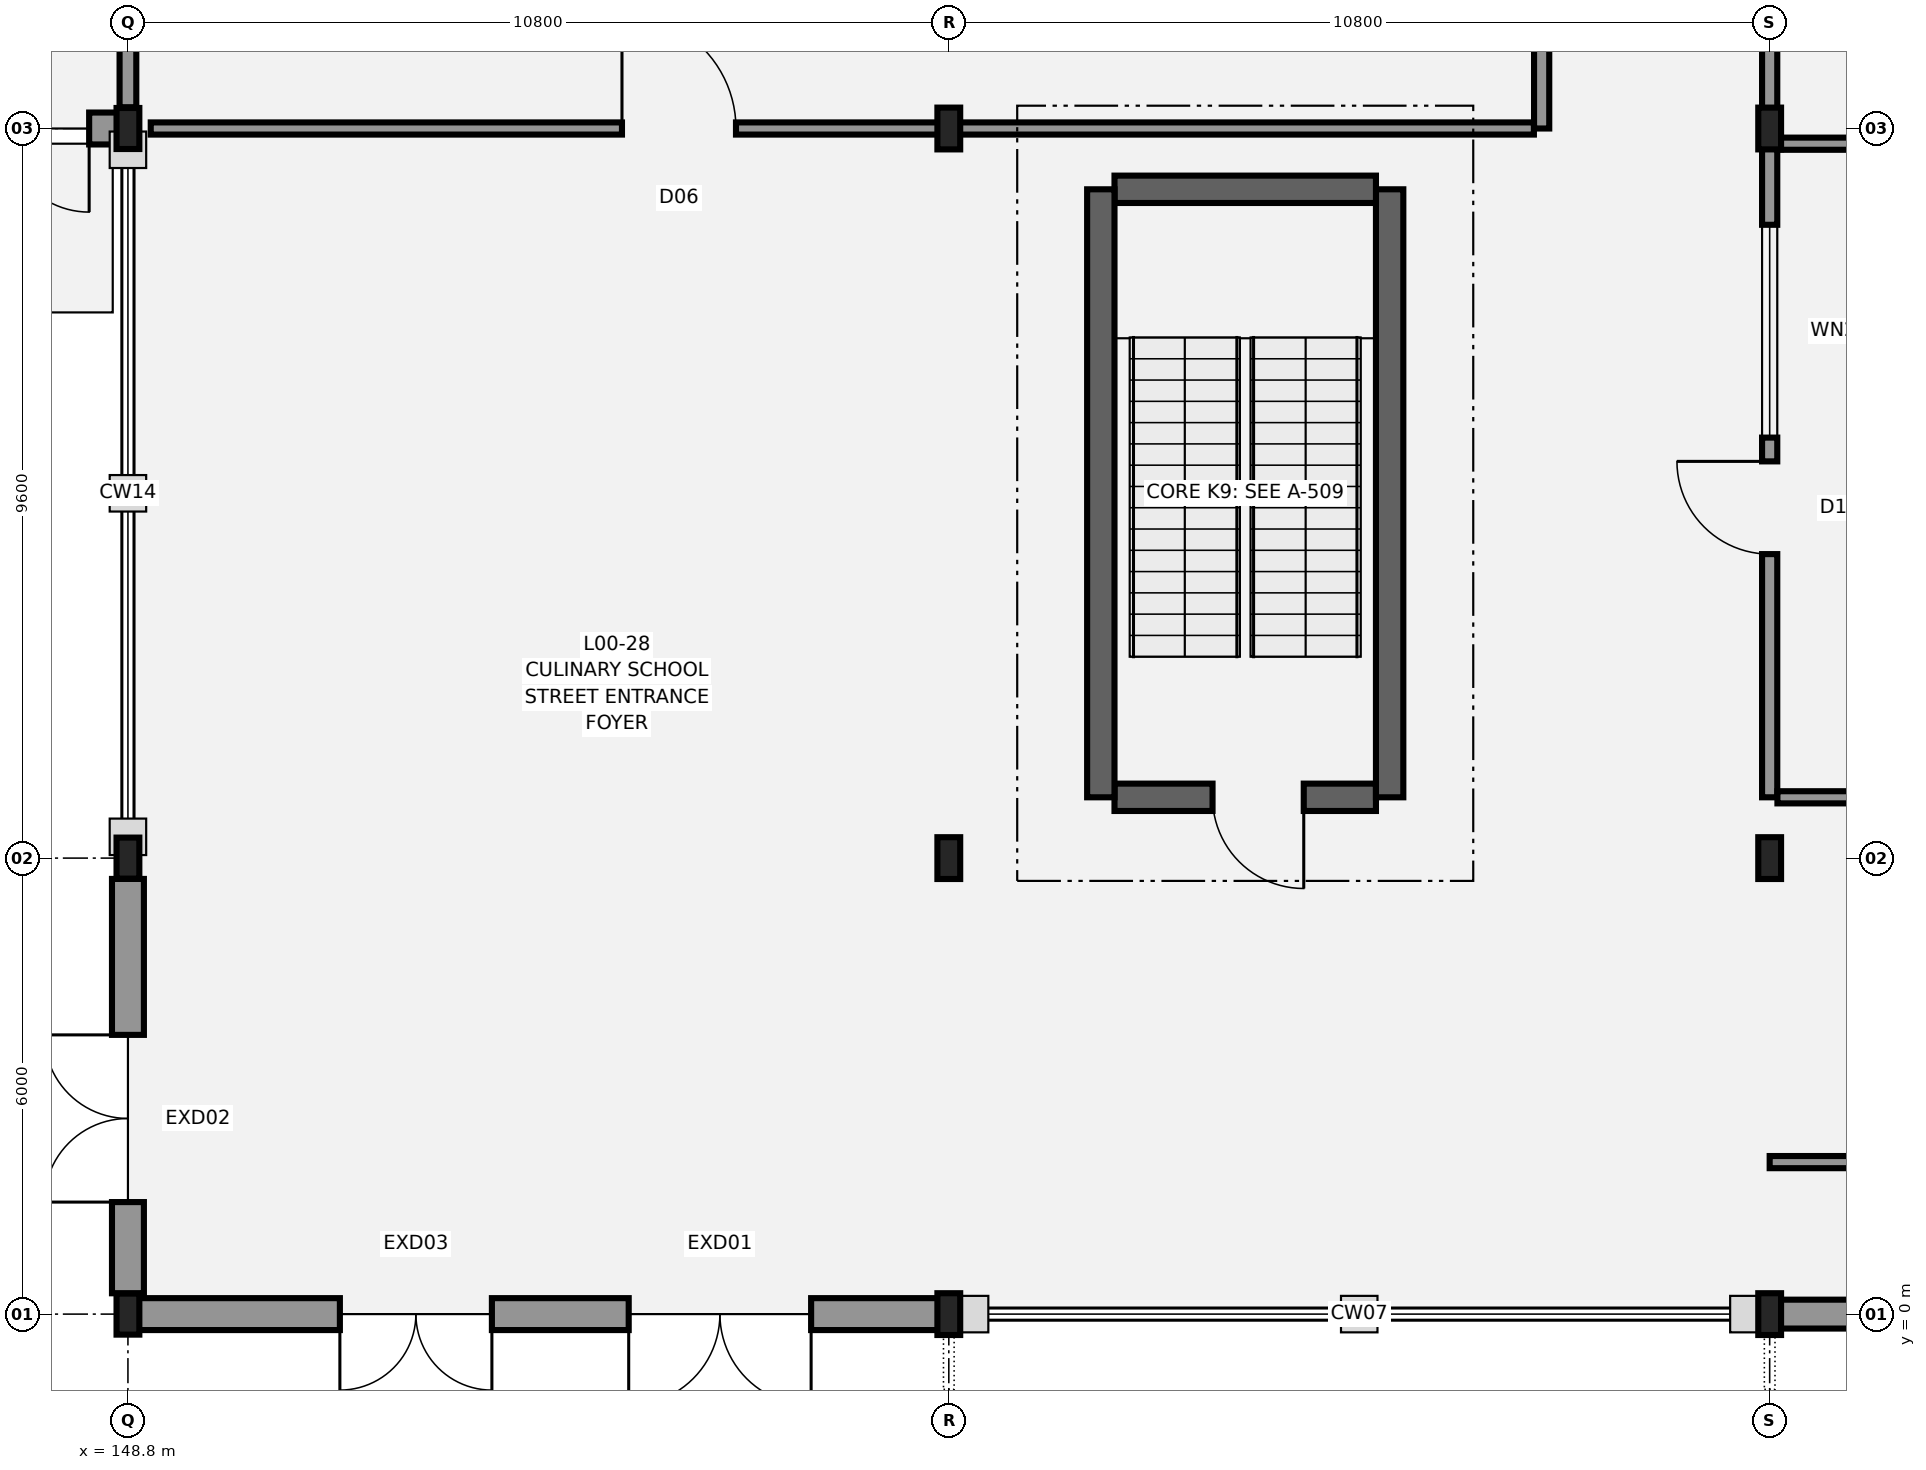
"""IFC4 building model, lengths in metres.
Left out: names, types, materials, properties, quantities, classifications, styles, units other than length and angle.
Written with IfcOpenShell. Run it as: python <this file> out.ifc"""

import sys

from ifc_helpers import new_model, si_unit, direction, frame, frame_2d, origin, origin_2d, place, context, subcontext, project, spatial, rectangle, i_section, extrude, element, fill, save


model = new_model("IFC4")
c1 = context("Model", 3, precision=1e-05, world=origin(), true_north=direction((0.0, 1.0)))
c2 = subcontext(c1, "Body", "Model", "MODEL_VIEW")
j1 = project(units=[si_unit("LENGTHUNIT", "METRE"), si_unit("PLANEANGLEUNIT", "RADIAN")], contexts=[c1])
p1 = place(None, origin())
s1 = spatial("IfcSite", under=j1, at=p1, CompositionType="ELEMENT")
p2 = place(p1, origin())
s2 = spatial("IfcBuilding", under=s1, at=p2, CompositionType="ELEMENT")
p3 = place(p2, origin())
s3 = spatial("IfcBuildingStorey", under=s2, at=p3, CompositionType="ELEMENT", Elevation=0.0)
for number, where, z_axis, x_axis in (
    (1, (148.8, 0.0, 0.0), (0.0, 0.0, 1.0), (1.0, 0.0, 0.0)),
    (2, (148.8, 6.0, 0.0), (0.0, 0.0, 1.0), (1.0, 0.0, 0.0)),
    (3, (148.8, 15.6, 0.0), (0.0, 0.0, 1.0), (1.0, 0.0, 0.0)),
):
    element("IfcColumn", number, at=place(p3, frame(where, z_axis=z_axis, x_axis=x_axis)), inside=s3, PredefinedType="COLUMN", context=c2, shape_type="SweptSolid", body=[
        extrude(i_section(OverallWidth=0.3, OverallDepth=0.54, WebThickness=0.012, FlangeThickness=0.024, FilletRadius=0.027, at=origin_2d()), origin(), (0.0, 0.0, 1.0), 5.4),
    ])
for number, where, z_axis, x_axis in (
    (4, (159.6, 0.0, 0.0), (0.0, 0.0, 1.0), (1.0, 0.0, 0.0)),
    (5, (159.6, 6.0, 0.0), (0.0, 0.0, 1.0), (1.0, 0.0, 0.0)),
    (6, (159.6, 15.6, 0.0), (0.0, 0.0, 1.0), (1.0, 0.0, 0.0)),
    (7, (170.4, 0.0, 0.0), (0.0, 0.0, 1.0), (1.0, 0.0, 0.0)),
    (8, (170.4, 6.0, 0.0), (0.0, 0.0, 1.0), (1.0, 0.0, 0.0)),
    (9, (170.4, 15.6, 0.0), (0.0, 0.0, 1.0), (1.0, 0.0, 0.0)),
):
    element("IfcColumn", number, at=place(p3, frame(where, z_axis=z_axis, x_axis=x_axis)), inside=s3, PredefinedType="COLUMN", context=c2, shape_type="SweptSolid", body=[
        extrude(i_section(OverallWidth=0.3, OverallDepth=0.55, WebThickness=0.015, FlangeThickness=0.029, FilletRadius=0.027, at=origin_2d()), origin(), (0.0, 0.0, 1.0), 5.4),
    ])
p4 = place(p3, frame((165.22, 6.8, 0.0), z_axis=(0.0, 0.0, 1.0), x_axis=(-1.0, 0.0, 0.0)))
e10 = element("IfcWall", 10, at=p4, inside=s3, PredefinedType="SHEAR", context=c2, shape_type="SweptSolid", body=[
    extrude(rectangle(XDim=3.44, YDim=0.36, at=frame_2d((1.72, 0.0))), origin(), (0.0, 0.0, 1.0), 5.12),
])
p5 = place(p4, frame((0.95, 0.0, 0.0)))
e11 = element("IfcOpeningElement", 11, at=p5, cuts=e10, PredefinedType="OPENING", context=c2, shape_type="SweptSolid", body=[
    extrude(rectangle(XDim=1.2, YDim=2.2, at=frame_2d((0.6, 1.1))), frame((0.0, 0.19, 0.0), z_axis=(0.0, -1.0, 0.0), x_axis=(1.0, 0.0, 0.0)), (0.0, 0.0, 1.0), 0.38),
])
p6 = place(p3, frame((165.4, 6.8, 0.0), z_axis=(0.0, 0.0, 1.0), x_axis=(0.0, 1.0, 0.0)))
e12 = element("IfcWall", 12, at=p6, inside=s3, PredefinedType="SHEAR", context=c2, shape_type="SweptSolid", body=[
    extrude(rectangle(XDim=8.0, YDim=0.36, at=frame_2d((4.0, 0.0))), origin(), (0.0, 0.0, 1.0), 5.12),
])
p7 = place(p3, frame((165.22, 14.8, 0.0), z_axis=(0.0, 0.0, 1.0), x_axis=(-1.0, 0.0, 0.0)))
e13 = element("IfcWall", 13, at=p7, inside=s3, PredefinedType="SHEAR", context=c2, shape_type="SweptSolid", body=[
    extrude(rectangle(XDim=3.44, YDim=0.36, at=frame_2d((1.72, 0.0))), origin(), (0.0, 0.0, 1.0), 5.12),
])
p8 = place(p3, frame((161.6, 14.8, 0.0), z_axis=(0.0, 0.0, 1.0), x_axis=(0.0, -1.0, 0.0)))
e14 = element("IfcWall", 14, at=p8, inside=s3, PredefinedType="SHEAR", context=c2, shape_type="SweptSolid", body=[
    extrude(rectangle(XDim=8.0, YDim=0.36, at=frame_2d((4.0, 0.0))), origin(), (0.0, 0.0, 1.0), 5.12),
])
p9 = place(p3, frame((148.79, 15.6, 0.0), z_axis=(0.0, 0.0, 1.0), x_axis=(-1.0, 0.0, 0.0)))
e15 = element("IfcWall", 15, at=p9, inside=s3, PredefinedType="STANDARD", context=c2, shape_type="SweptSolid", body=[
    extrude(rectangle(XDim=3.59, YDim=0.42, at=frame_2d((1.795, 0.0))), origin(), (0.0, 0.0, 1.0), 4.665),
])
p10 = place(p9, frame((0.5, 0.0, 0.0)))
e16 = element("IfcOpeningElement", 16, at=p10, cuts=e15, PredefinedType="OPENING", context=c2, shape_type="SweptSolid", body=[
    extrude(rectangle(XDim=2.2, YDim=2.4, at=frame_2d((1.1, 1.2))), frame((0.0, 0.22, 0.0), z_axis=(0.0, -1.0, 0.0), x_axis=(1.0, 0.0, 0.0)), (0.0, 0.0, 1.0), 0.44),
])
p11 = place(p3, frame((159.588, 0.0, 0.0), z_axis=(0.0, 0.0, 1.0), x_axis=(-1.0, 0.0, 0.0)))
e17 = element("IfcWall", 17, at=p11, inside=s3, PredefinedType="STANDARD", context=c2, shape_type="SweptSolid", body=[
    extrude(rectangle(XDim=10.778, YDim=0.42, at=frame_2d((5.389, 0.0))), origin(), (0.0, 0.0, 1.0), 4.665),
])
p12 = place(p11, frame((1.8, 0.0, 0.0)))
e18 = element("IfcOpeningElement", 18, at=p12, cuts=e17, PredefinedType="OPENING", context=c2, shape_type="SweptSolid", body=[
    extrude(rectangle(XDim=2.4, YDim=2.4, at=frame_2d((1.2, 1.2))), frame((0.0, 0.22, 0.0), z_axis=(0.0, -1.0, 0.0), x_axis=(1.0, 0.0, 0.0)), (0.0, 0.0, 1.0), 0.44),
])
p13 = place(p11, frame((6.0, 0.0, 0.0)))
e19 = element("IfcOpeningElement", 19, at=p13, cuts=e17, PredefinedType="OPENING", context=c2, shape_type="SweptSolid", body=[
    extrude(rectangle(XDim=2.0, YDim=2.3, at=frame_2d((1.0, 1.15))), frame((0.0, 0.22, 0.0), z_axis=(0.0, -1.0, 0.0), x_axis=(1.0, 0.0, 0.0)), (0.0, 0.0, 1.0), 0.44),
])
p14 = place(p3, frame((181.188, 0.0, 0.0), z_axis=(0.0, 0.0, 1.0), x_axis=(-1.0, 0.0, 0.0)))
e20 = element("IfcWall", 20, at=p14, inside=s3, PredefinedType="STANDARD", context=c2, shape_type="SweptSolid", body=[
    extrude(rectangle(XDim=10.777, YDim=0.38, at=frame_2d((5.388, 0.0))), origin(), (0.0, 0.0, 1.0), 4.665),
])
p15 = place(p14, frame((1.0, 0.0, 0.8)))
e21 = element("IfcOpeningElement", 21, at=p15, cuts=e20, PredefinedType="OPENING", context=c2, shape_type="SweptSolid", body=[
    extrude(rectangle(XDim=1.2, YDim=1.8, at=frame_2d((0.6, 0.9))), frame((0.0, 0.2, 0.0), z_axis=(0.0, -1.0, 0.0), x_axis=(1.0, 0.0, 0.0)), (0.0, 0.0, 1.0), 0.4),
])
p16 = place(p14, frame((5.6, 0.0, 0.8)))
e22 = element("IfcOpeningElement", 22, at=p16, cuts=e20, PredefinedType="OPENING", context=c2, shape_type="SweptSolid", body=[
    extrude(rectangle(XDim=1.5, YDim=1.8, at=frame_2d((0.75, 0.9))), frame((0.0, 0.2, 0.0), z_axis=(0.0, -1.0, 0.0), x_axis=(1.0, 0.0, 0.0)), (0.0, 0.0, 1.0), 0.4),
])
p17 = place(p3, frame((148.8, 0.274, 0.0), z_axis=(0.0, 0.0, 1.0), x_axis=(0.0, 1.0, 0.0)))
e23 = element("IfcWall", 23, at=p17, inside=s3, PredefinedType="STANDARD", context=c2, shape_type="SweptSolid", body=[
    extrude(rectangle(XDim=5.452, YDim=0.42, at=frame_2d((2.726, 0.0))), origin(), (0.0, 0.0, 1.0), 4.765),
])
p18 = place(p17, frame((1.2, 0.0, 0.0)))
e24 = element("IfcOpeningElement", 24, at=p18, cuts=e23, PredefinedType="OPENING", context=c2, shape_type="SweptSolid", body=[
    extrude(rectangle(XDim=2.2, YDim=2.4, at=frame_2d((1.1, 1.2))), frame((0.0, 0.22, 0.0), z_axis=(0.0, -1.0, 0.0), x_axis=(1.0, 0.0, 0.0)), (0.0, 0.0, 1.0), 0.44),
])
p19 = place(p3, frame((148.8, 15.88, 0.0), z_axis=(0.0, 0.0, 1.0), x_axis=(0.0, 1.0, 0.0)))
e25 = element("IfcWall", 25, at=p19, inside=s3, PredefinedType="PARTITIONING", context=c2, shape_type="SweptSolid", body=[
    extrude(rectangle(XDim=11.44, YDim=0.22, at=frame_2d((5.72, 0.0))), origin(), (0.0, 0.0, 1.0), 4.765),
])
p20 = place(p3, frame((170.4, 2.0, 0.0), z_axis=(0.0, 0.0, 1.0), x_axis=(1.0, 0.0, 0.0)))
e26 = element("IfcWall", 26, at=p20, inside=s3, PredefinedType="PARTITIONING", context=c2, shape_type="SweptSolid", body=[
    extrude(rectangle(XDim=21.388, YDim=0.16, at=frame_2d((10.694, 0.0))), origin(), (0.0, 0.0, 1.0), 5.04),
])
p21 = place(p20, frame((5.0, 0.0, 0.0)))
e27 = element("IfcOpeningElement", 27, at=p21, cuts=e26, PredefinedType="OPENING", context=c2, shape_type="SweptSolid", body=[
    extrude(rectangle(XDim=1.3, YDim=2.15, at=frame_2d((0.65, 1.075))), frame((0.0, 0.09, 0.0), z_axis=(0.0, -1.0, 0.0), x_axis=(1.0, 0.0, 0.0)), (0.0, 0.0, 1.0), 0.18),
])
p22 = place(p3, frame((167.4, 15.6, 0.0), z_axis=(0.0, 0.0, 1.0), x_axis=(0.0, 1.0, 0.0)))
e28 = element("IfcWall", 28, at=p22, inside=s3, PredefinedType="PARTITIONING", context=c2, shape_type="SweptSolid", body=[
    extrude(rectangle(XDim=47.828, YDim=0.2, at=frame_2d((23.914, 0.0))), origin(), (0.0, 0.0, 1.0), 5.04),
])
p23 = place(p22, frame((8.0, 0.0, 0.0)))
e29 = element("IfcOpeningElement", 29, at=p23, cuts=e28, PredefinedType="OPENING", context=c2, shape_type="SweptSolid", body=[
    extrude(rectangle(XDim=1.6, YDim=2.2, at=frame_2d((0.8, 1.1))), frame((0.0, 0.11, 0.0), z_axis=(0.0, -1.0, 0.0), x_axis=(1.0, 0.0, 0.0)), (0.0, 0.0, 1.0), 0.22),
])
p24 = place(p22, frame((32.0, 0.0, 0.0)))
e30 = element("IfcOpeningElement", 30, at=p24, cuts=e28, PredefinedType="OPENING", context=c2, shape_type="SweptSolid", body=[
    extrude(rectangle(XDim=1.6, YDim=2.2, at=frame_2d((0.8, 1.1))), frame((0.0, 0.11, 0.0), z_axis=(0.0, -1.0, 0.0), x_axis=(1.0, 0.0, 0.0)), (0.0, 0.0, 1.0), 0.22),
])
p25 = place(p22, frame((5.0, 0.0, 1.05)))
e31 = element("IfcOpeningElement", 31, at=p25, cuts=e28, PredefinedType="OPENING", context=c2, shape_type="SweptSolid", body=[
    extrude(rectangle(XDim=2.2, YDim=1.3, at=frame_2d((1.1, 0.65))), frame((0.0, 0.11, 0.0), z_axis=(0.0, -1.0, 0.0), x_axis=(1.0, 0.0, 0.0)), (0.0, 0.0, 1.0), 0.22),
])
p26 = place(p3, frame((149.1, 15.6, 0.0), z_axis=(0.0, 0.0, 1.0), x_axis=(1.0, 0.0, 0.0)))
e32 = element("IfcWall", 32, at=p26, inside=s3, PredefinedType="PARTITIONING", context=c2, shape_type="SweptSolid", body=[
    extrude(rectangle(XDim=18.198, YDim=0.16, at=frame_2d((9.099, 0.0))), origin(), (0.0, 0.0, 1.0), 4.665),
])
p27 = place(p26, frame((6.2, 0.0, 0.0)))
e33 = element("IfcOpeningElement", 33, at=p27, cuts=e32, PredefinedType="OPENING", context=c2, shape_type="SweptSolid", body=[
    extrude(rectangle(XDim=1.5, YDim=2.15, at=frame_2d((0.75, 1.075))), frame((0.0, 0.09, 0.0), z_axis=(0.0, -1.0, 0.0), x_axis=(1.0, 0.0, 0.0)), (0.0, 0.0, 1.0), 0.18),
])
p28 = place(p3, frame((170.4, 6.8, 0.0), z_axis=(0.0, 0.0, 1.0), x_axis=(0.0, 1.0, 0.0)))
e34 = element("IfcWall", 34, at=p28, inside=s3, PredefinedType="PARTITIONING", context=c2, shape_type="SweptSolid", body=[
    extrude(rectangle(XDim=56.628, YDim=0.2, at=frame_2d((28.314, 0.0))), origin(), (0.0, 0.0, 1.0), 4.765),
])
p29 = place(p28, frame((3.2, 0.0, 0.0)))
e35 = element("IfcOpeningElement", 35, at=p29, cuts=e34, PredefinedType="OPENING", context=c2, shape_type="SweptSolid", body=[
    extrude(rectangle(XDim=1.22, YDim=2.15, at=frame_2d((0.61, 1.075))), frame((0.0, 0.11, 0.0), z_axis=(0.0, -1.0, 0.0), x_axis=(1.0, 0.0, 0.0)), (0.0, 0.0, 1.0), 0.22),
])
p30 = place(p28, frame((13.0, 0.0, 0.0)))
e36 = element("IfcOpeningElement", 36, at=p30, cuts=e34, PredefinedType="OPENING", context=c2, shape_type="SweptSolid", body=[
    extrude(rectangle(XDim=1.6, YDim=2.2, at=frame_2d((0.8, 1.1))), frame((0.0, 0.11, 0.0), z_axis=(0.0, -1.0, 0.0), x_axis=(1.0, 0.0, 0.0)), (0.0, 0.0, 1.0), 0.22),
])
p31 = place(p28, frame((26.0, 0.0, 0.0)))
e37 = element("IfcOpeningElement", 37, at=p31, cuts=e34, PredefinedType="OPENING", context=c2, shape_type="SweptSolid", body=[
    extrude(rectangle(XDim=1.5, YDim=2.15, at=frame_2d((0.75, 1.075))), frame((0.0, 0.11, 0.0), z_axis=(0.0, -1.0, 0.0), x_axis=(1.0, 0.0, 0.0)), (0.0, 0.0, 1.0), 0.22),
])
p32 = place(p28, frame((47.6, 0.0, 0.0)))
e38 = element("IfcOpeningElement", 38, at=p32, cuts=e34, PredefinedType="OPENING", context=c2, shape_type="SweptSolid", body=[
    extrude(rectangle(XDim=1.5, YDim=2.15, at=frame_2d((0.75, 1.075))), frame((0.0, 0.11, 0.0), z_axis=(0.0, -1.0, 0.0), x_axis=(1.0, 0.0, 0.0)), (0.0, 0.0, 1.0), 0.22),
])
p33 = place(p28, frame((53.2, 0.0, 0.0)))
e39 = element("IfcOpeningElement", 39, at=p33, cuts=e34, PredefinedType="OPENING", context=c2, shape_type="SweptSolid", body=[
    extrude(rectangle(XDim=1.02, YDim=2.12, at=frame_2d((0.51, 1.06))), frame((0.0, 0.11, 0.0), z_axis=(0.0, -1.0, 0.0), x_axis=(1.0, 0.0, 0.0)), (0.0, 0.0, 1.0), 0.22),
])
p34 = place(p28, frame((4.733, 0.0, 1.05)))
e40 = element("IfcOpeningElement", 40, at=p34, cuts=e34, PredefinedType="OPENING", context=c2, shape_type="SweptSolid", body=[
    extrude(rectangle(XDim=2.8, YDim=1.3, at=frame_2d((1.4, 0.65))), frame((0.0, 0.11, 0.0), z_axis=(0.0, -1.0, 0.0), x_axis=(1.0, 0.0, 0.0)), (0.0, 0.0, 1.0), 0.22),
])
p35 = place(p3, frame((170.502, 6.8, 0.0), z_axis=(0.0, 0.0, 1.0), x_axis=(1.0, 0.0, 0.0)))
e41 = element("IfcWall", 41, at=p35, inside=s3, PredefinedType="PARTITIONING", context=c2, shape_type="SweptSolid", body=[
    extrude(rectangle(XDim=12.716, YDim=0.16, at=frame_2d((6.358, 0.0))), origin(), (0.0, 0.0, 1.0), 5.04),
])
p36 = place(p3, frame((170.502, 15.4, 0.0), z_axis=(0.0, 0.0, 1.0), x_axis=(1.0, 0.0, 0.0)))
e42 = element("IfcWall", 42, at=p36, inside=s3, PredefinedType="PARTITIONING", context=c2, shape_type="SweptSolid", body=[
    extrude(rectangle(XDim=12.698, YDim=0.16, at=frame_2d((6.349, 0.0))), origin(), (0.0, 0.0, 1.0), 4.665),
])
p37 = place(p10, origin())
e43 = element("IfcDoor", 43, at=p37, inside=s3, OperationType="DOUBLE_DOOR_SINGLE_SWING", PredefinedType="DOOR", context=c2, shape_type="SweptSolid", body=[
    extrude(rectangle(XDim=2.2, YDim=2.4, at=frame_2d((1.1, 1.2))), frame((0.0, 0.025, 0.0), z_axis=(0.0, -1.0, 0.0), x_axis=(1.0, 0.0, 0.0)), (0.0, 0.0, 1.0), 0.05),
])
fill(e16, e43)
p38 = place(p12, origin())
e44 = element("IfcDoor", 44, at=p38, inside=s3, OperationType="DOUBLE_DOOR_SINGLE_SWING", PredefinedType="DOOR", context=c2, shape_type="SweptSolid", body=[
    extrude(rectangle(XDim=2.4, YDim=2.4, at=frame_2d((1.2, 1.2))), frame((0.0, 0.025, 0.0), z_axis=(0.0, -1.0, 0.0), x_axis=(1.0, 0.0, 0.0)), (0.0, 0.0, 1.0), 0.05),
])
fill(e18, e44)
p39 = place(p13, origin())
e45 = element("IfcDoor", 45, at=p39, inside=s3, OperationType="DOUBLE_DOOR_SINGLE_SWING", PredefinedType="DOOR", context=c2, shape_type="SweptSolid", body=[
    extrude(rectangle(XDim=2.0, YDim=2.3, at=frame_2d((1.0, 1.15))), frame((0.0, 0.025, 0.0), z_axis=(0.0, -1.0, 0.0), x_axis=(1.0, 0.0, 0.0)), (0.0, 0.0, 1.0), 0.05),
])
fill(e19, e45)
p40 = place(p18, origin())
e46 = element("IfcDoor", 46, at=p40, inside=s3, OperationType="DOUBLE_DOOR_SINGLE_SWING", PredefinedType="DOOR", context=c2, shape_type="SweptSolid", body=[
    extrude(rectangle(XDim=2.2, YDim=2.4, at=frame_2d((1.1, 1.2))), frame((0.0, 0.025, 0.0), z_axis=(0.0, -1.0, 0.0), x_axis=(1.0, 0.0, 0.0)), (0.0, 0.0, 1.0), 0.05),
])
fill(e24, e46)
p41 = place(p27, origin())
e47 = element("IfcDoor", 47, at=p41, inside=s3, OperationType="SINGLE_SWING_LEFT", PredefinedType="DOOR", context=c2, shape_type="SweptSolid", body=[
    extrude(rectangle(XDim=1.5, YDim=2.15, at=frame_2d((0.75, 1.075))), frame((0.0, 0.025, 0.0), z_axis=(0.0, -1.0, 0.0), x_axis=(1.0, 0.0, 0.0)), (0.0, 0.0, 1.0), 0.05),
])
fill(e33, e47)
p42 = place(p29, origin())
e48 = element("IfcDoor", 48, at=p42, inside=s3, OperationType="SINGLE_SWING_RIGHT", PredefinedType="DOOR", context=c2, shape_type="SweptSolid", body=[
    extrude(rectangle(XDim=1.22, YDim=2.15, at=frame_2d((0.61, 1.075))), frame((0.0, 0.025, 0.0), z_axis=(0.0, -1.0, 0.0), x_axis=(1.0, 0.0, 0.0)), (0.0, 0.0, 1.0), 0.05),
])
fill(e35, e48)
p43 = place(p34, origin())
e49 = element("IfcWindow", 49, at=p43, inside=s3, PartitioningType="SINGLE_PANEL", PredefinedType="WINDOW", context=c2, shape_type="SweptSolid", body=[
    extrude(rectangle(XDim=2.8, YDim=1.3, at=frame_2d((1.4, 0.65))), frame((0.0, 0.03, 0.0), z_axis=(0.0, -1.0, 0.0), x_axis=(1.0, 0.0, 0.0)), (0.0, 0.0, 1.0), 0.06),
])
fill(e40, e49)
p44 = place(p5, origin())
e50 = element("IfcDoor", 50, at=p44, inside=s3, OperationType="SINGLE_SWING_LEFT", PredefinedType="DOOR", context=c2, shape_type="SweptSolid", body=[
    extrude(rectangle(XDim=1.2, YDim=2.2, at=frame_2d((0.6, 1.1))), frame((0.0, 0.025, 0.0), z_axis=(0.0, -1.0, 0.0), x_axis=(1.0, 0.0, 0.0)), (0.0, 0.0, 1.0), 0.05),
])
fill(e11, e50)
save(model, sys.argv[1])
